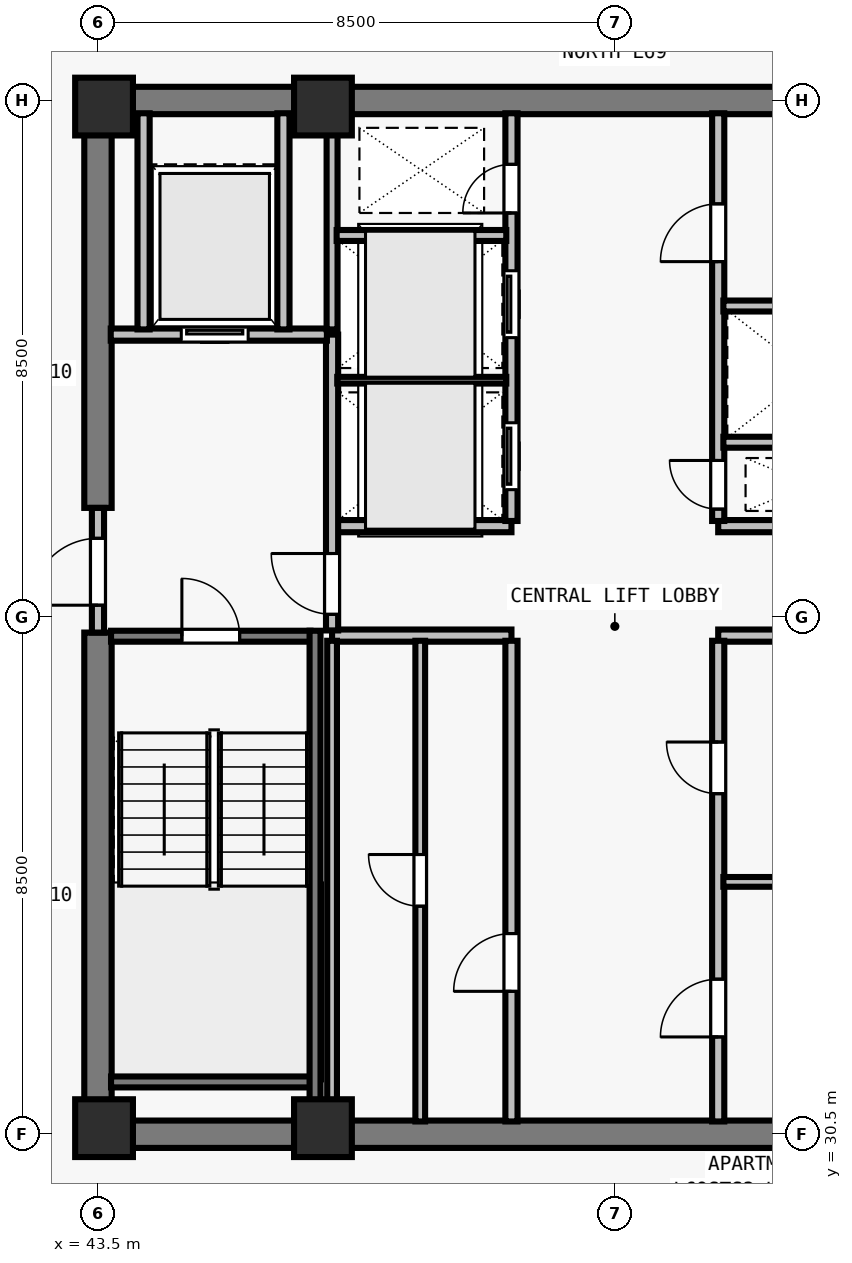
"""IFC4 building model, lengths in metres.
Left out: names, types, materials, properties, quantities, classifications, styles, units other than length and angle.
Written with IfcOpenShell. Run it as: python <this file> out.ifc"""

import sys

from ifc_helpers import new_model, si_unit, direction, frame, frame_2d, origin, origin_2d, place, context, subcontext, project, spatial, rectangle, extrude, element, fill, save


model = new_model("IFC4")
c1 = context("Model", 3, precision=1e-05, world=origin(), true_north=direction((0.0, 1.0)))
c2 = subcontext(c1, "Body", "Model", "MODEL_VIEW")
j1 = project(units=[si_unit("LENGTHUNIT", "METRE"), si_unit("PLANEANGLEUNIT", "RADIAN")], contexts=[c1])
p1 = place(None, origin())
s1 = spatial("IfcSite", under=j1, at=p1, CompositionType="ELEMENT")
p2 = place(p1, origin())
s2 = spatial("IfcBuilding", under=s1, at=p2, CompositionType="ELEMENT")
p3 = place(p2, frame((0.0, 0.0, 251.5)))
s3 = spatial("IfcBuildingStorey", under=s2, at=p3, CompositionType="ELEMENT", Elevation=251.5)
for number, where, z_axis, x_axis in (
    (1, (43.6, 30.6, 0.0), (0.0, 0.0, 1.0), (1.0, 0.0, 0.0)),
    (2, (47.2, 30.6, 0.0), (0.0, 0.0, 1.0), (1.0, 0.0, 0.0)),
    (3, (43.6, 47.4, 0.0), (0.0, 0.0, 1.0), (1.0, 0.0, 0.0)),
    (4, (47.2, 47.4, 0.0), (0.0, 0.0, 1.0), (1.0, 0.0, 0.0)),
):
    element("IfcColumn", number, at=place(p3, frame(where, z_axis=z_axis, x_axis=x_axis)), inside=s3, PredefinedType="COLUMN", context=c2, shape_type="SweptSolid", body=[
        extrude(rectangle(XDim=0.95, YDim=0.95, at=origin_2d()), origin(), (0.0, 0.0, 1.0), 3.5),
    ])
for number, where, z_axis, x_axis in (
    (5, (43.275, 30.5, 0.0), (0.0, 0.0, 1.0), (1.0, 0.0, 0.0)),
    (6, (43.275, 47.5, 0.0), (0.0, 0.0, 1.0), (1.0, 0.0, 0.0)),
):
    element("IfcWall", number, at=place(p3, frame(where, z_axis=z_axis, x_axis=x_axis)), inside=s3, PredefinedType="SHEAR", context=c2, shape_type="SweptSolid", body=[
        extrude(rectangle(XDim=17.45, YDim=0.45, at=frame_2d((8.725, 0.0))), origin(), (0.0, 0.0, 1.0), 3.29),
    ])
p4 = place(p3, frame((43.5, 30.715, 0.0), z_axis=(0.0, 0.0, 1.0), x_axis=(0.0, 1.0, 0.0)))
e7 = element("IfcWall", 7, at=p4, inside=s3, PredefinedType="SHEAR", context=c2, shape_type="SweptSolid", body=[
    extrude(rectangle(XDim=8.035, YDim=0.45, at=frame_2d((4.018, 0.0))), origin(), (0.0, 0.0, 1.0), 3.29),
])
p5 = place(p3, frame((43.5, 40.8, 0.0), z_axis=(0.0, 0.0, 1.0), x_axis=(0.0, 1.0, 0.0)))
e8 = element("IfcWall", 8, at=p5, inside=s3, PredefinedType="SHEAR", context=c2, shape_type="SweptSolid", body=[
    extrude(rectangle(XDim=6.485, YDim=0.45, at=frame_2d((3.242, 0.0))), origin(), (0.0, 0.0, 1.0), 3.29),
])
for number, where, z_axis, x_axis in (
    (9, (47.35, 38.7, 0.0), (0.0, 0.0, 1.0), (1.0, 0.0, 0.0)),
    (10, (47.35, 40.5, 0.0), (0.0, 0.0, 1.0), (1.0, 0.0, 0.0)),
    (11, (53.7, 38.7, 0.0), (0.0, 0.0, 1.0), (1.0, 0.0, 0.0)),
    (12, (53.7, 40.5, 0.0), (0.0, 0.0, 1.0), (1.0, 0.0, 0.0)),
):
    element("IfcWall", number, at=place(p3, frame(where, z_axis=z_axis, x_axis=x_axis)), inside=s3, PredefinedType="SOLIDWALL", context=c2, shape_type="SweptSolid", body=[
        extrude(rectangle(XDim=2.95, YDim=0.2, at=frame_2d((1.475, 0.0))), origin(), (0.0, 0.0, 1.0), 3.29),
    ])
p6 = place(p3, frame((50.3, 30.71, 0.0), z_axis=(0.0, 0.0, 1.0), x_axis=(0.0, 1.0, 0.0)))
e13 = element("IfcWall", 13, at=p6, inside=s3, PredefinedType="SOLIDWALL", context=c2, shape_type="SweptSolid", body=[
    extrude(rectangle(XDim=7.905, YDim=0.2, at=frame_2d((3.953, 0.0))), origin(), (0.0, 0.0, 1.0), 3.29),
])
p7 = place(p6, frame((2.14, 0.0, 0.0)))
e14 = element("IfcOpeningElement", 14, at=p7, cuts=e13, PredefinedType="OPENING", context=c2, shape_type="SweptSolid", body=[
    extrude(rectangle(XDim=0.95, YDim=2.12, at=frame_2d((0.475, 1.06))), frame((0.0, 0.11, 0.0), z_axis=(0.0, -1.0, 0.0), x_axis=(1.0, 0.0, 0.0)), (0.0, 0.0, 1.0), 0.22),
])
p8 = place(p3, frame((53.7, 30.71, 0.0), z_axis=(0.0, 0.0, 1.0), x_axis=(0.0, 1.0, 0.0)))
e15 = element("IfcWall", 15, at=p8, inside=s3, PredefinedType="SOLIDWALL", context=c2, shape_type="SweptSolid", body=[
    extrude(rectangle(XDim=7.905, YDim=0.2, at=frame_2d((3.953, 0.0))), origin(), (0.0, 0.0, 1.0), 3.29),
])
p9 = place(p8, frame((1.39, 0.0, 0.0)))
e16 = element("IfcOpeningElement", 16, at=p9, cuts=e15, PredefinedType="OPENING", context=c2, shape_type="SweptSolid", body=[
    extrude(rectangle(XDim=0.95, YDim=2.12, at=frame_2d((0.475, 1.06))), frame((0.0, 0.11, 0.0), z_axis=(0.0, -1.0, 0.0), x_axis=(1.0, 0.0, 0.0)), (0.0, 0.0, 1.0), 0.22),
])
p10 = place(p8, frame((5.39, 0.0, 0.0)))
e17 = element("IfcOpeningElement", 17, at=p10, cuts=e15, PredefinedType="OPENING", context=c2, shape_type="SweptSolid", body=[
    extrude(rectangle(XDim=0.85, YDim=2.12, at=frame_2d((0.425, 1.06))), frame((0.0, 0.11, 0.0), z_axis=(0.0, -1.0, 0.0), x_axis=(1.0, 0.0, 0.0)), (0.0, 0.0, 1.0), 0.22),
])
p11 = place(p3, frame((50.3, 40.585, 0.0), z_axis=(0.0, 0.0, 1.0), x_axis=(0.0, 1.0, 0.0)))
e18 = element("IfcWall", 18, at=p11, inside=s3, PredefinedType="SOLIDWALL", context=c2, shape_type="SweptSolid", body=[
    extrude(rectangle(XDim=6.705, YDim=0.2, at=frame_2d((3.353, 0.0))), origin(), (0.0, 0.0, 1.0), 3.29),
])
p12 = place(p11, frame((0.515, 0.0, 0.0)))
e19 = element("IfcOpeningElement", 19, at=p12, cuts=e18, PredefinedType="OPENING", context=c2, shape_type="SweptSolid", body=[
    extrude(rectangle(XDim=1.1, YDim=2.2, at=frame_2d((0.55, 1.1))), frame((0.0, 0.11, 0.0), z_axis=(0.0, -1.0, 0.0), x_axis=(1.0, 0.0, 0.0)), (0.0, 0.0, 1.0), 0.22),
])
p13 = place(p11, frame((3.015, 0.0, 0.0)))
e20 = element("IfcOpeningElement", 20, at=p13, cuts=e18, PredefinedType="OPENING", context=c2, shape_type="SweptSolid", body=[
    extrude(rectangle(XDim=1.1, YDim=2.2, at=frame_2d((0.55, 1.1))), frame((0.0, 0.11, 0.0), z_axis=(0.0, -1.0, 0.0), x_axis=(1.0, 0.0, 0.0)), (0.0, 0.0, 1.0), 0.22),
])
p14 = place(p11, frame((5.065, 0.0, 0.0)))
e21 = element("IfcOpeningElement", 21, at=p14, cuts=e18, PredefinedType="OPENING", context=c2, shape_type="SweptSolid", body=[
    extrude(rectangle(XDim=0.8, YDim=2.08, at=frame_2d((0.4, 1.04))), frame((0.0, 0.11, 0.0), z_axis=(0.0, -1.0, 0.0), x_axis=(1.0, 0.0, 0.0)), (0.0, 0.0, 1.0), 0.22),
])
p15 = place(p3, frame((53.7, 40.585, 0.0), z_axis=(0.0, 0.0, 1.0), x_axis=(0.0, 1.0, 0.0)))
e22 = element("IfcWall", 22, at=p15, inside=s3, PredefinedType="SOLIDWALL", context=c2, shape_type="SweptSolid", body=[
    extrude(rectangle(XDim=6.705, YDim=0.2, at=frame_2d((3.353, 0.0))), origin(), (0.0, 0.0, 1.0), 3.29),
])
p16 = place(p15, frame((0.195, 0.0, 0.0)))
e23 = element("IfcOpeningElement", 23, at=p16, cuts=e22, PredefinedType="OPENING", context=c2, shape_type="SweptSolid", body=[
    extrude(rectangle(XDim=0.8, YDim=2.08, at=frame_2d((0.4, 1.04))), frame((0.0, 0.11, 0.0), z_axis=(0.0, -1.0, 0.0), x_axis=(1.0, 0.0, 0.0)), (0.0, 0.0, 1.0), 0.22),
])
p17 = place(p15, frame((4.265, 0.0, 0.0)))
e24 = element("IfcOpeningElement", 24, at=p17, cuts=e22, PredefinedType="OPENING", context=c2, shape_type="SweptSolid", body=[
    extrude(rectangle(XDim=0.95, YDim=2.12, at=frame_2d((0.475, 1.06))), frame((0.0, 0.11, 0.0), z_axis=(0.0, -1.0, 0.0), x_axis=(1.0, 0.0, 0.0)), (0.0, 0.0, 1.0), 0.22),
])
p18 = place(p3, frame((43.5, 38.75, 0.0), z_axis=(0.0, 0.0, 1.0), x_axis=(0.0, 1.0, 0.0)))
e25 = element("IfcWall", 25, at=p18, inside=s3, PredefinedType="SOLIDWALL", context=c2, shape_type="SweptSolid", body=[
    extrude(rectangle(XDim=2.05, YDim=0.2, at=frame_2d((1.025, 0.0))), origin(), (0.0, 0.0, 1.0), 3.29),
])
p19 = place(p18, frame((0.45, 0.0, 0.0)))
e26 = element("IfcOpeningElement", 26, at=p19, cuts=e25, PredefinedType="OPENING", context=c2, shape_type="SweptSolid", body=[
    extrude(rectangle(XDim=1.1, YDim=2.15, at=frame_2d((0.55, 1.075))), frame((0.0, 0.11, 0.0), z_axis=(0.0, -1.0, 0.0), x_axis=(1.0, 0.0, 0.0)), (0.0, 0.0, 1.0), 0.22),
])
p20 = place(p3, frame((47.35, 38.785, 0.0), z_axis=(0.0, 0.0, 1.0), x_axis=(0.0, 1.0, 0.0)))
e27 = element("IfcWall", 27, at=p20, inside=s3, PredefinedType="SOLIDWALL", context=c2, shape_type="SweptSolid", body=[
    extrude(rectangle(XDim=4.865, YDim=0.2, at=frame_2d((2.433, 0.0))), origin(), (0.0, 0.0, 1.0), 3.29),
])
p21 = place(p20, frame((0.265, 0.0, 0.0)))
e28 = element("IfcOpeningElement", 28, at=p21, cuts=e27, PredefinedType="OPENING", context=c2, shape_type="SweptSolid", body=[
    extrude(rectangle(XDim=1.0, YDim=2.15, at=frame_2d((0.5, 1.075))), frame((0.0, 0.11, 0.0), z_axis=(0.0, -1.0, 0.0), x_axis=(1.0, 0.0, 0.0)), (0.0, 0.0, 1.0), 0.22),
])
p22 = place(p3, frame((43.71, 43.65, 0.0), z_axis=(0.0, 0.0, 1.0), x_axis=(1.0, 0.0, 0.0)))
e29 = element("IfcWall", 29, at=p22, inside=s3, PredefinedType="SOLIDWALL", context=c2, shape_type="SweptSolid", body=[
    extrude(rectangle(XDim=3.555, YDim=0.2, at=frame_2d((1.777, 0.0))), origin(), (0.0, 0.0, 1.0), 3.29),
])
p23 = place(p22, frame((1.16, 0.0, 0.0)))
e30 = element("IfcOpeningElement", 30, at=p23, cuts=e29, PredefinedType="OPENING", context=c2, shape_type="SweptSolid", body=[
    extrude(rectangle(XDim=1.1, YDim=2.2, at=frame_2d((0.55, 1.1))), frame((0.0, 0.11, 0.0), z_axis=(0.0, -1.0, 0.0), x_axis=(1.0, 0.0, 0.0)), (0.0, 0.0, 1.0), 0.22),
])
for number, where, z_axis, x_axis in (
    (31, (46.55, 43.735, 0.0), (0.0, 0.0, 1.0), (0.0, 1.0, 0.0)),
    (32, (44.25, 43.735, 0.0), (0.0, 0.0, 1.0), (0.0, 1.0, 0.0)),
):
    element("IfcWall", number, at=place(p3, frame(where, z_axis=z_axis, x_axis=x_axis)), inside=s3, PredefinedType="SOLIDWALL", context=c2, shape_type="SweptSolid", body=[
        extrude(rectangle(XDim=3.555, YDim=0.2, at=frame_2d((1.777, 0.0))), origin(), (0.0, 0.0, 1.0), 3.29),
    ])
p24 = place(p3, frame((47.35, 30.71, 0.0), z_axis=(0.0, 0.0, 1.0), x_axis=(0.0, 1.0, 0.0)))
e33 = element("IfcWall", 33, at=p24, inside=s3, PredefinedType="PARTITIONING", context=c2, shape_type="SweptSolid", body=[
    extrude(rectangle(XDim=7.905, YDim=0.16, at=frame_2d((3.953, 0.0))), origin(), (0.0, 0.0, 1.0), 3.29),
])
p25 = place(p3, frame((48.8, 30.71, 0.0), z_axis=(0.0, 0.0, 1.0), x_axis=(0.0, 1.0, 0.0)))
e34 = element("IfcWall", 34, at=p25, inside=s3, PredefinedType="PARTITIONING", context=c2, shape_type="SweptSolid", body=[
    extrude(rectangle(XDim=7.905, YDim=0.16, at=frame_2d((3.953, 0.0))), origin(), (0.0, 0.0, 1.0), 3.29),
])
p26 = place(p25, frame((3.54, 0.0, 0.0)))
e35 = element("IfcOpeningElement", 35, at=p26, cuts=e34, PredefinedType="OPENING", context=c2, shape_type="SweptSolid", body=[
    extrude(rectangle(XDim=0.85, YDim=2.12, at=frame_2d((0.425, 1.06))), frame((0.0, 0.09, 0.0), z_axis=(0.0, -1.0, 0.0), x_axis=(1.0, 0.0, 0.0)), (0.0, 0.0, 1.0), 0.18),
])
p27 = place(p3, frame((53.785, 34.65, 0.0), z_axis=(0.0, 0.0, 1.0), x_axis=(1.0, 0.0, 0.0)))
e36 = element("IfcWall", 36, at=p27, inside=s3, PredefinedType="PARTITIONING", context=c2, shape_type="SweptSolid", body=[
    extrude(rectangle(XDim=2.8, YDim=0.16, at=frame_2d((1.4, 0.0))), origin(), (0.0, 0.0, 1.0), 3.29),
])
p28 = place(p3, frame((47.35, 43.735, 0.0), z_axis=(0.0, 0.0, 1.0), x_axis=(0.0, 1.0, 0.0)))
e37 = element("IfcWall", 37, at=p28, inside=s3, PredefinedType="SOLIDWALL", context=c2, shape_type="SweptSolid", body=[
    extrude(rectangle(XDim=3.555, YDim=0.18, at=frame_2d((1.777, 0.0))), origin(), (0.0, 0.0, 1.0), 3.29),
])
p29 = place(p3, frame((47.435, 42.9, 0.0), z_axis=(0.0, 0.0, 1.0), x_axis=(1.0, 0.0, 0.0)))
e38 = element("IfcWall", 38, at=p29, inside=s3, PredefinedType="PARTITIONING", context=c2, shape_type="SweptSolid", body=[
    extrude(rectangle(XDim=2.78, YDim=0.11, at=frame_2d((1.39, 0.0))), origin(), (0.0, 0.0, 1.0), 3.29),
])
p30 = place(p3, frame((47.425, 45.28, 0.0), z_axis=(0.0, 0.0, 1.0), x_axis=(1.0, 0.0, 0.0)))
e39 = element("IfcWall", 39, at=p30, inside=s3, PredefinedType="SOLIDWALL", context=c2, shape_type="SweptSolid", body=[
    extrude(rectangle(XDim=2.79, YDim=0.18, at=frame_2d((1.395, 0.0))), origin(), (0.0, 0.0, 1.0), 3.29),
])
p31 = place(p3, frame((53.785, 41.88, 0.0), z_axis=(0.0, 0.0, 1.0), x_axis=(1.0, 0.0, 0.0)))
e40 = element("IfcWall", 40, at=p31, inside=s3, PredefinedType="SOLIDWALL", context=c2, shape_type="SweptSolid", body=[
    extrude(rectangle(XDim=2.78, YDim=0.18, at=frame_2d((1.39, 0.0))), origin(), (0.0, 0.0, 1.0), 3.29),
])
p32 = place(p3, frame((53.785, 44.12, 0.0), z_axis=(0.0, 0.0, 1.0), x_axis=(1.0, 0.0, 0.0)))
e41 = element("IfcWall", 41, at=p32, inside=s3, PredefinedType="SOLIDWALL", context=c2, shape_type="SweptSolid", body=[
    extrude(rectangle(XDim=2.79, YDim=0.18, at=frame_2d((1.395, 0.0))), origin(), (0.0, 0.0, 1.0), 3.29),
])
p33 = place(p3, frame((43.715, 38.69, 0.0), z_axis=(0.0, 0.0, 1.0), x_axis=(1.0, 0.0, 0.0)))
e42 = element("IfcWall", 42, at=p33, inside=s3, PredefinedType="SOLIDWALL", context=c2, shape_type="SweptSolid", body=[
    extrude(rectangle(XDim=3.28, YDim=0.18, at=frame_2d((1.64, 0.0))), origin(), (0.0, 0.0, 1.0), 3.29),
])
p34 = place(p33, frame((1.165, 0.0, 0.0)))
e43 = element("IfcOpeningElement", 43, at=p34, cuts=e42, PredefinedType="OPENING", context=c2, shape_type="SweptSolid", body=[
    extrude(rectangle(XDim=0.95, YDim=2.15, at=frame_2d((0.475, 1.075))), frame((0.0, 0.1, 0.0), z_axis=(0.0, -1.0, 0.0), x_axis=(1.0, 0.0, 0.0)), (0.0, 0.0, 1.0), 0.2),
])
p35 = place(p3, frame((43.715, 31.36, 0.0), z_axis=(0.0, 0.0, 1.0), x_axis=(1.0, 0.0, 0.0)))
e44 = element("IfcWall", 44, at=p35, inside=s3, PredefinedType="SOLIDWALL", context=c2, shape_type="SweptSolid", body=[
    extrude(rectangle(XDim=3.28, YDim=0.18, at=frame_2d((1.64, 0.0))), origin(), (0.0, 0.0, 1.0), 3.29),
])
p36 = place(p3, frame((47.07, 38.78, 0.0), z_axis=(0.0, 0.0, 1.0), x_axis=(0.0, -1.0, 0.0)))
e45 = element("IfcWall", 45, at=p36, inside=s3, PredefinedType="SOLIDWALL", context=c2, shape_type="SweptSolid", body=[
    extrude(rectangle(XDim=8.067, YDim=0.18, at=frame_2d((4.034, 0.0))), origin(), (0.0, 0.0, 1.0), 3.29),
])
p37 = place(p19, origin())
e46 = element("IfcDoor", 46, at=p37, inside=s3, OperationType="SINGLE_SWING_LEFT", PredefinedType="DOOR", context=c2, shape_type="SweptSolid", body=[
    extrude(rectangle(XDim=1.1, YDim=2.15, at=frame_2d((0.55, 1.075))), frame((0.0, 0.025, 0.0), z_axis=(0.0, -1.0, 0.0), x_axis=(1.0, 0.0, 0.0)), (0.0, 0.0, 1.0), 0.05),
])
fill(e26, e46)
p38 = place(p21, origin())
e47 = element("IfcDoor", 47, at=p38, inside=s3, OperationType="SINGLE_SWING_RIGHT", PredefinedType="DOOR", context=c2, shape_type="SweptSolid", body=[
    extrude(rectangle(XDim=1.0, YDim=2.15, at=frame_2d((0.5, 1.075))), frame((0.0, 0.025, 0.0), z_axis=(0.0, -1.0, 0.0), x_axis=(1.0, 0.0, 0.0)), (0.0, 0.0, 1.0), 0.05),
])
fill(e28, e47)
p39 = place(p23, origin())
e48 = element("IfcDoor", 48, at=p39, inside=s3, OperationType="SLIDING_TO_LEFT", PredefinedType="DOOR", context=c2, shape_type="SweptSolid", body=[
    extrude(rectangle(XDim=1.1, YDim=2.2, at=frame_2d((0.55, 1.1))), frame((0.0, 0.025, 0.0), z_axis=(0.0, -1.0, 0.0), x_axis=(1.0, 0.0, 0.0)), (0.0, 0.0, 1.0), 0.05),
])
fill(e30, e48)
p40 = place(p7, origin())
e49 = element("IfcDoor", 49, at=p40, inside=s3, OperationType="SINGLE_SWING_LEFT", PredefinedType="DOOR", context=c2, shape_type="SweptSolid", body=[
    extrude(rectangle(XDim=0.95, YDim=2.12, at=frame_2d((0.475, 1.06))), frame((0.0, 0.025, 0.0), z_axis=(0.0, -1.0, 0.0), x_axis=(1.0, 0.0, 0.0)), (0.0, 0.0, 1.0), 0.05),
])
fill(e14, e49)
p41 = place(p26, origin())
e50 = element("IfcDoor", 50, at=p41, inside=s3, OperationType="SINGLE_SWING_RIGHT", PredefinedType="DOOR", context=c2, shape_type="SweptSolid", body=[
    extrude(rectangle(XDim=0.85, YDim=2.12, at=frame_2d((0.425, 1.06))), frame((0.0, 0.025, 0.0), z_axis=(0.0, -1.0, 0.0), x_axis=(1.0, 0.0, 0.0)), (0.0, 0.0, 1.0), 0.05),
])
fill(e35, e50)
p42 = place(p9, origin())
e51 = element("IfcDoor", 51, at=p42, inside=s3, OperationType="SINGLE_SWING_LEFT", PredefinedType="DOOR", context=c2, shape_type="SweptSolid", body=[
    extrude(rectangle(XDim=0.95, YDim=2.12, at=frame_2d((0.475, 1.06))), frame((0.0, 0.025, 0.0), z_axis=(0.0, -1.0, 0.0), x_axis=(1.0, 0.0, 0.0)), (0.0, 0.0, 1.0), 0.05),
])
fill(e16, e51)
p43 = place(p10, origin())
e52 = element("IfcDoor", 52, at=p43, inside=s3, OperationType="SINGLE_SWING_RIGHT", PredefinedType="DOOR", context=c2, shape_type="SweptSolid", body=[
    extrude(rectangle(XDim=0.85, YDim=2.12, at=frame_2d((0.425, 1.06))), frame((0.0, 0.025, 0.0), z_axis=(0.0, -1.0, 0.0), x_axis=(1.0, 0.0, 0.0)), (0.0, 0.0, 1.0), 0.05),
])
fill(e17, e52)
p44 = place(p12, origin())
e53 = element("IfcDoor", 53, at=p44, inside=s3, OperationType="SLIDING_TO_LEFT", PredefinedType="DOOR", context=c2, shape_type="SweptSolid", body=[
    extrude(rectangle(XDim=1.1, YDim=2.2, at=frame_2d((0.55, 1.1))), frame((0.0, 0.025, 0.0), z_axis=(0.0, -1.0, 0.0), x_axis=(1.0, 0.0, 0.0)), (0.0, 0.0, 1.0), 0.05),
])
fill(e19, e53)
p45 = place(p13, origin())
e54 = element("IfcDoor", 54, at=p45, inside=s3, OperationType="SLIDING_TO_LEFT", PredefinedType="DOOR", context=c2, shape_type="SweptSolid", body=[
    extrude(rectangle(XDim=1.1, YDim=2.2, at=frame_2d((0.55, 1.1))), frame((0.0, 0.025, 0.0), z_axis=(0.0, -1.0, 0.0), x_axis=(1.0, 0.0, 0.0)), (0.0, 0.0, 1.0), 0.05),
])
fill(e20, e54)
p46 = place(p14, origin())
e55 = element("IfcDoor", 55, at=p46, inside=s3, OperationType="SINGLE_SWING_LEFT", PredefinedType="DOOR", context=c2, shape_type="SweptSolid", body=[
    extrude(rectangle(XDim=0.8, YDim=2.08, at=frame_2d((0.4, 1.04))), frame((0.0, 0.025, 0.0), z_axis=(0.0, -1.0, 0.0), x_axis=(1.0, 0.0, 0.0)), (0.0, 0.0, 1.0), 0.05),
])
fill(e21, e55)
p47 = place(p16, origin())
e56 = element("IfcDoor", 56, at=p47, inside=s3, OperationType="SINGLE_SWING_RIGHT", PredefinedType="DOOR", context=c2, shape_type="SweptSolid", body=[
    extrude(rectangle(XDim=0.8, YDim=2.08, at=frame_2d((0.4, 1.04))), frame((0.0, 0.025, 0.0), z_axis=(0.0, -1.0, 0.0), x_axis=(1.0, 0.0, 0.0)), (0.0, 0.0, 1.0), 0.05),
])
fill(e23, e56)
p48 = place(p17, origin())
e57 = element("IfcDoor", 57, at=p48, inside=s3, OperationType="SINGLE_SWING_LEFT", PredefinedType="DOOR", context=c2, shape_type="SweptSolid", body=[
    extrude(rectangle(XDim=0.95, YDim=2.12, at=frame_2d((0.475, 1.06))), frame((0.0, 0.025, 0.0), z_axis=(0.0, -1.0, 0.0), x_axis=(1.0, 0.0, 0.0)), (0.0, 0.0, 1.0), 0.05),
])
fill(e24, e57)
p49 = place(p34, origin())
e58 = element("IfcDoor", 58, at=p49, inside=s3, OperationType="SINGLE_SWING_LEFT", PredefinedType="DOOR", context=c2, shape_type="SweptSolid", body=[
    extrude(rectangle(XDim=0.95, YDim=2.15, at=frame_2d((0.475, 1.075))), frame((0.0, 0.025, 0.0), z_axis=(0.0, -1.0, 0.0), x_axis=(1.0, 0.0, 0.0)), (0.0, 0.0, 1.0), 0.05),
])
fill(e43, e58)
save(model, sys.argv[1])
